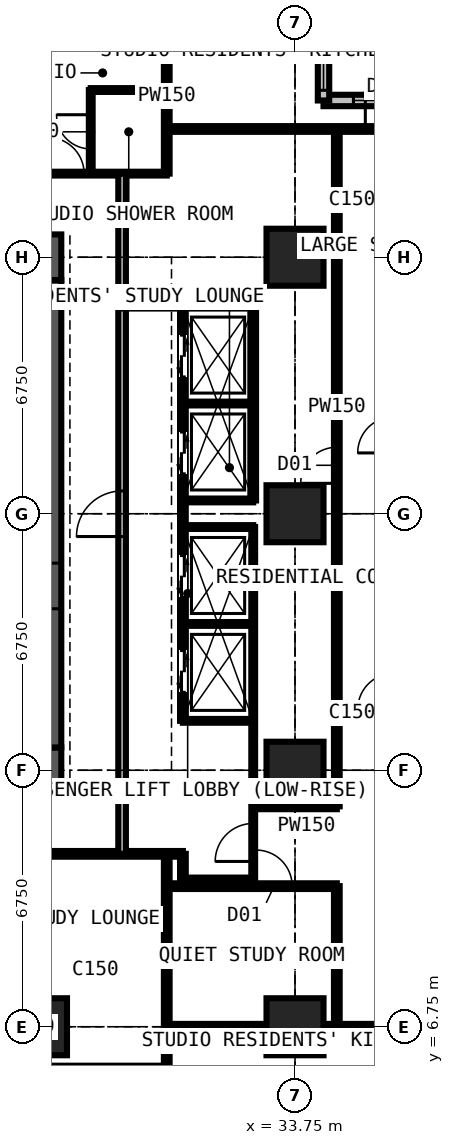
"""IFC4 building model, lengths in metres.
Left out: names, types, materials, properties, quantities, classifications, styles, units other than length and angle.
Written with IfcOpenShell. Run it as: python <this file> out.ifc"""

import sys

from ifc_helpers import new_model, si_unit, direction, frame, frame_2d, origin, origin_2d, place, context, subcontext, project, spatial, rectangle, extrude, element, fill, save


model = new_model("IFC4")
c1 = context("Model", 3, precision=1e-05, world=origin(), true_north=direction((0.0, 1.0)))
c2 = subcontext(c1, "Body", "Model", "MODEL_VIEW")
j1 = project(units=[si_unit("LENGTHUNIT", "METRE"), si_unit("PLANEANGLEUNIT", "RADIAN")], contexts=[c1])
p1 = place(None, origin())
s1 = spatial("IfcSite", under=j1, at=p1, CompositionType="ELEMENT")
p2 = place(p1, origin())
s2 = spatial("IfcBuilding", under=s1, at=p2, CompositionType="ELEMENT")
p3 = place(p2, frame((0.0, 0.0, 112.5)))
s3 = spatial("IfcBuildingStorey", under=s2, at=p3, CompositionType="ELEMENT", Elevation=112.5)
for number, where, z_axis, x_axis in (
    (1, (27.0, 6.75, 0.0), (0.0, 0.0, 1.0), (1.0, 0.0, 0.0)),
    (2, (33.75, 6.75, 0.0), (0.0, 0.0, 1.0), (1.0, 0.0, 0.0)),
    (3, (33.75, 13.5, 0.0), (0.0, 0.0, 1.0), (1.0, 0.0, 0.0)),
    (4, (33.75, 20.25, 0.0), (0.0, 0.0, 1.0), (1.0, 0.0, 0.0)),
    (5, (33.75, 27.0, 0.0), (0.0, 0.0, 1.0), (1.0, 0.0, 0.0)),
):
    element("IfcColumn", number, at=place(p3, frame(where, z_axis=z_axis, x_axis=x_axis)), inside=s3, PredefinedType="COLUMN", context=c2, shape_type="SweptSolid", body=[
        extrude(rectangle(XDim=1.5, YDim=1.5, at=origin_2d()), origin(), (0.0, 0.0, 1.0), 3.6),
    ])
p4 = place(p3, frame((12.9, 13.5, 0.0), z_axis=(0.0, 0.0, 1.0), x_axis=(1.0, 0.0, 0.0)))
e6 = element("IfcWall", 6, at=p4, inside=s3, PredefinedType="SHEAR", context=c2, shape_type="SweptSolid", body=[
    extrude(rectangle(XDim=14.7, YDim=1.2, at=frame_2d((7.35, 0.0))), origin(), (0.0, 0.0, 1.0), 3.6),
])
p5 = place(p3, frame((27.0, 14.1, 0.0), z_axis=(0.0, 0.0, 1.0), x_axis=(0.0, 1.0, 0.0)))
e7 = element("IfcWall", 7, at=p5, inside=s3, PredefinedType="SHEAR", context=c2, shape_type="SweptSolid", body=[
    extrude(rectangle(XDim=12.3, YDim=1.2, at=frame_2d((6.15, 0.0))), origin(), (0.0, 0.0, 1.0), 3.6),
])
p6 = place(p5, frame((3.65, 0.0, 0.0)))
e8 = element("IfcOpeningElement", 8, at=p6, cuts=e7, PredefinedType="OPENING", context=c2, shape_type="SweptSolid", body=[
    extrude(rectangle(XDim=1.2, YDim=2.2, at=frame_2d((0.6, 1.1))), frame((0.0, 0.61, 0.0), z_axis=(0.0, -1.0, 0.0), x_axis=(1.0, 0.0, 0.0)), (0.0, 0.0, 1.0), 1.22),
])
p7 = place(p3, frame((27.6, 27.0, 0.0), z_axis=(0.0, 0.0, 1.0), x_axis=(-1.0, 0.0, 0.0)))
e9 = element("IfcWall", 9, at=p7, inside=s3, PredefinedType="SHEAR", context=c2, shape_type="SweptSolid", body=[
    extrude(rectangle(XDim=14.7, YDim=1.2, at=frame_2d((7.35, 0.0))), origin(), (0.0, 0.0, 1.0), 3.6),
])
p8 = place(p7, frame((5.225, 0.0, 0.0)))
e10 = element("IfcOpeningElement", 10, at=p8, cuts=e9, PredefinedType="OPENING", context=c2, shape_type="SweptSolid", body=[
    extrude(rectangle(XDim=0.9, YDim=2.2, at=frame_2d((0.45, 1.1))), frame((0.0, 0.61, 0.0), z_axis=(0.0, -1.0, 0.0), x_axis=(1.0, 0.0, 0.0)), (0.0, 0.0, 1.0), 1.22),
])
p9 = place(p7, frame((8.2, 0.0, 0.0)))
e11 = element("IfcOpeningElement", 11, at=p9, cuts=e9, PredefinedType="OPENING", context=c2, shape_type="SweptSolid", body=[
    extrude(rectangle(XDim=1.0, YDim=2.2, at=frame_2d((0.5, 1.1))), frame((0.0, 0.61, 0.0), z_axis=(0.0, -1.0, 0.0), x_axis=(1.0, 0.0, 0.0)), (0.0, 0.0, 1.0), 1.22),
])
p10 = place(p3, frame((37.875, 31.125, 0.0), z_axis=(0.0, 0.0, 1.0), x_axis=(-1.0, 0.0, 0.0)))
e12 = element("IfcWall", 12, at=p10, inside=s3, PredefinedType="SOLIDWALL", context=c2, shape_type="SweptSolid", body=[
    extrude(rectangle(XDim=3.375, YDim=0.3, at=frame_2d((1.688, 0.0))), origin(), (0.0, 0.0, 1.0), 3.375),
])
p11 = place(p10, frame((0.788, 0.0, 0.6)))
e13 = element("IfcOpeningElement", 13, at=p11, cuts=e12, PredefinedType="OPENING", context=c2, shape_type="SweptSolid", body=[
    extrude(rectangle(XDim=1.8, YDim=2.1, at=frame_2d((0.9, 1.05))), frame((0.0, 0.16, 0.0), z_axis=(0.0, -1.0, 0.0), x_axis=(1.0, 0.0, 0.0)), (0.0, 0.0, 1.0), 0.32),
])
p12 = place(p3, frame((34.5, 31.125, 0.0), z_axis=(0.0, 0.0, 1.0), x_axis=(0.0, 1.0, 0.0)))
e14 = element("IfcWall", 14, at=p12, inside=s3, PredefinedType="SOLIDWALL", context=c2, shape_type="SweptSolid", body=[
    extrude(rectangle(XDim=3.375, YDim=0.3, at=frame_2d((1.688, 0.0))), origin(), (0.0, 0.0, 1.0), 3.375),
])
p13 = place(p12, frame((0.268, 0.0, 0.9)))
e15 = element("IfcOpeningElement", 15, at=p13, cuts=e14, PredefinedType="OPENING", context=c2, shape_type="SweptSolid", body=[
    extrude(rectangle(XDim=1.5, YDim=1.8, at=frame_2d((0.75, 0.9))), frame((0.0, 0.16, 0.0), z_axis=(0.0, -1.0, 0.0), x_axis=(1.0, 0.0, 0.0)), (0.0, 0.0, 1.0), 0.32),
])
p14 = place(p3, frame((10.125, 11.3, 0.0), z_axis=(0.0, 0.0, 1.0), x_axis=(1.0, 0.0, 0.0)))
e16 = element("IfcWall", 16, at=p14, inside=s3, PredefinedType="PARTITIONING", context=c2, shape_type="SweptSolid", body=[
    extrude(rectangle(XDim=20.675, YDim=0.15, at=frame_2d((10.337, 0.0))), origin(), (0.0, 0.0, 1.0), 3.375),
])
p15 = place(p14, frame((11.312, 0.0, 0.0)))
e17 = element("IfcOpeningElement", 17, at=p15, cuts=e16, PredefinedType="OPENING", context=c2, shape_type="SweptSolid", body=[
    extrude(rectangle(XDim=1.0, YDim=2.2, at=frame_2d((0.5, 1.1))), frame((0.0, 0.085, 0.0), z_axis=(0.0, -1.0, 0.0), x_axis=(1.0, 0.0, 0.0)), (0.0, 0.0, 1.0), 0.17),
])
p16 = place(p3, frame((11.3, 29.2, 0.0), z_axis=(0.0, 0.0, 1.0), x_axis=(1.0, 0.0, 0.0)))
e18 = element("IfcWall", 18, at=p16, inside=s3, PredefinedType="PARTITIONING", context=c2, shape_type="SweptSolid", body=[
    extrude(rectangle(XDim=19.075, YDim=0.1, at=frame_2d((9.538, 0.0))), origin(), (0.0, 0.0, 1.0), 3.375),
])
p17 = place(p16, frame((6.4, 0.0, 0.0)))
e19 = element("IfcOpeningElement", 19, at=p17, cuts=e18, PredefinedType="OPENING", context=c2, shape_type="SweptSolid", body=[
    extrude(rectangle(XDim=0.95, YDim=2.2, at=frame_2d((0.475, 1.1))), frame((0.0, 0.06, 0.0), z_axis=(0.0, -1.0, 0.0), x_axis=(1.0, 0.0, 0.0)), (0.0, 0.0, 1.0), 0.12),
])
p18 = place(p16, frame((13.15, 0.0, 0.0)))
e20 = element("IfcOpeningElement", 20, at=p18, cuts=e18, PredefinedType="OPENING", context=c2, shape_type="SweptSolid", body=[
    extrude(rectangle(XDim=0.95, YDim=2.2, at=frame_2d((0.475, 1.1))), frame((0.0, 0.06, 0.0), z_axis=(0.0, -1.0, 0.0), x_axis=(1.0, 0.0, 0.0)), (0.0, 0.0, 1.0), 0.12),
])
p19 = place(p16, frame((15.95, 0.0, 0.0)))
e21 = element("IfcOpeningElement", 21, at=p19, cuts=e18, PredefinedType="OPENING", context=c2, shape_type="SweptSolid", body=[
    extrude(rectangle(XDim=0.95, YDim=2.2, at=frame_2d((0.475, 1.1))), frame((0.0, 0.06, 0.0), z_axis=(0.0, -1.0, 0.0), x_axis=(1.0, 0.0, 0.0)), (0.0, 0.0, 1.0), 0.12),
])
p20 = place(p16, frame((0.6, 0.0, 0.0)))
e22 = element("IfcOpeningElement", 22, at=p20, cuts=e18, PredefinedType="OPENING", context=c2, shape_type="SweptSolid", body=[
    extrude(rectangle(XDim=1.0, YDim=2.2, at=frame_2d((0.5, 1.1))), frame((0.0, 0.06, 0.0), z_axis=(0.0, -1.0, 0.0), x_axis=(1.0, 0.0, 0.0)), (0.0, 0.0, 1.0), 0.12),
])
p21 = place(p3, frame((28.375, 29.2, 0.0), z_axis=(0.0, 0.0, 1.0), x_axis=(0.0, 1.0, 0.0)))
e23 = element("IfcWall", 23, at=p21, inside=s3, PredefinedType="PARTITIONING", context=c2, shape_type="SweptSolid", body=[
    extrude(rectangle(XDim=2.2, YDim=0.1, at=frame_2d((1.1, 0.0))), origin(), (0.0, 0.0, 1.0), 3.375),
])
p22 = place(p21, frame((0.65, 0.0, 0.0)))
e24 = element("IfcOpeningElement", 24, at=p22, cuts=e23, PredefinedType="OPENING", context=c2, shape_type="SweptSolid", body=[
    extrude(rectangle(XDim=0.9, YDim=2.2, at=frame_2d((0.45, 1.1))), frame((0.0, 0.06, 0.0), z_axis=(0.0, -1.0, 0.0), x_axis=(1.0, 0.0, 0.0)), (0.0, 0.0, 1.0), 0.12),
])
p23 = place(p3, frame((28.375, 31.4, 0.0), z_axis=(0.0, 0.0, 1.0), x_axis=(1.0, 0.0, 0.0)))
e25 = element("IfcWall", 25, at=p23, inside=s3, PredefinedType="PARTITIONING", context=c2, shape_type="SweptSolid", body=[
    extrude(rectangle(XDim=2.0, YDim=0.1, at=frame_2d((1.0, 0.0))), origin(), (0.0, 0.0, 1.0), 3.375),
])
p24 = place(p3, frame((29.2, 11.3, 0.0), z_axis=(0.0, 0.0, 1.0), x_axis=(0.0, 1.0, 0.0)))
e26 = element("IfcWall", 26, at=p24, inside=s3, PredefinedType="PARTITIONING", context=c2, shape_type="SweptSolid", body=[
    extrude(rectangle(XDim=17.9, YDim=0.2, at=frame_2d((8.95, 0.0))), origin(), (0.0, 0.0, 1.0), 3.375),
])
p25 = place(p24, frame((8.35, 0.0, 0.0)))
e27 = element("IfcOpeningElement", 27, at=p25, cuts=e26, PredefinedType="OPENING", context=c2, shape_type="SweptSolid", body=[
    extrude(rectangle(XDim=1.2, YDim=2.2, at=frame_2d((0.6, 1.1))), frame((0.0, 0.11, 0.0), z_axis=(0.0, -1.0, 0.0), x_axis=(1.0, 0.0, 0.0)), (0.0, 0.0, 1.0), 0.22),
])
p26 = place(p3, frame((29.2, 25.7, 0.0), z_axis=(0.0, 0.0, 1.0), x_axis=(1.0, 0.0, 0.0)))
e28 = element("IfcWall", 28, at=p26, inside=s3, PredefinedType="SHEAR", context=c2, shape_type="SweptSolid", body=[
    extrude(rectangle(XDim=3.45, YDim=0.1, at=frame_2d((1.725, 0.0))), origin(), (0.0, 0.0, 1.0), 3.375),
])
p27 = place(p3, frame((30.375, -0.734, 0.0), z_axis=(0.0, 0.0, 1.0), x_axis=(0.0, 1.0, 0.0)))
e29 = element("IfcWall", 29, at=p27, inside=s3, PredefinedType="PARTITIONING", context=c2, shape_type="SweptSolid", body=[
    extrude(rectangle(XDim=12.034, YDim=0.15, at=frame_2d((6.017, 0.0))), origin(), (0.0, 0.0, 1.0), 3.375),
])
p28 = place(p27, frame((5.134, 0.0, 0.0)))
e30 = element("IfcOpeningElement", 30, at=p28, cuts=e29, PredefinedType="OPENING", context=c2, shape_type="SweptSolid", body=[
    extrude(rectangle(XDim=1.0, YDim=2.2, at=frame_2d((0.5, 1.1))), frame((0.0, 0.085, 0.0), z_axis=(0.0, -1.0, 0.0), x_axis=(1.0, 0.0, 0.0)), (0.0, 0.0, 1.0), 0.17),
])
p29 = place(p3, frame((30.375, 6.75, 0.0), z_axis=(0.0, 0.0, 1.0), x_axis=(1.0, 0.0, 0.0)))
e31 = element("IfcWall", 31, at=p29, inside=s3, PredefinedType="PARTITIONING", context=c2, shape_type="SweptSolid", body=[
    extrude(rectangle(XDim=5.975, YDim=0.15, at=frame_2d((2.988, 0.0))), origin(), (0.0, 0.0, 1.0), 2.877),
])
p30 = place(p3, frame((30.375, 10.45, 0.0), z_axis=(0.0, 0.0, 1.0), x_axis=(1.0, 0.0, 0.0)))
e32 = element("IfcWall", 32, at=p30, inside=s3, PredefinedType="PARTITIONING", context=c2, shape_type="SweptSolid", body=[
    extrude(rectangle(XDim=4.475, YDim=0.15, at=frame_2d((2.238, 0.0))), origin(), (0.0, 0.0, 1.0), 3.375),
])
p31 = place(p30, frame((2.35, 0.0, 0.0)))
e33 = element("IfcOpeningElement", 33, at=p31, cuts=e32, PredefinedType="OPENING", context=c2, shape_type="SweptSolid", body=[
    extrude(rectangle(XDim=0.95, YDim=2.2, at=frame_2d((0.475, 1.1))), frame((0.0, 0.085, 0.0), z_axis=(0.0, -1.0, 0.0), x_axis=(1.0, 0.0, 0.0)), (0.0, 0.0, 1.0), 0.17),
])
p32 = place(p3, frame((30.375, 29.2, 0.0), z_axis=(0.0, 0.0, 1.0), x_axis=(0.0, 1.0, 0.0)))
e34 = element("IfcWall", 34, at=p32, inside=s3, PredefinedType="PARTITIONING", context=c2, shape_type="SweptSolid", body=[
    extrude(rectangle(XDim=5.284, YDim=0.15, at=frame_2d((2.642, 0.0))), origin(), (0.0, 0.0, 1.0), 3.375),
])
p33 = place(p3, frame((30.375, 30.375, 0.0), z_axis=(0.0, 0.0, 1.0), x_axis=(1.0, 0.0, 0.0)))
e35 = element("IfcWall", 35, at=p33, inside=s3, PredefinedType="PARTITIONING", context=c2, shape_type="SweptSolid", body=[
    extrude(rectangle(XDim=7.35, YDim=0.15, at=frame_2d((3.675, 0.0))), origin(), (0.0, 0.0, 1.0), 2.877),
])
p34 = place(p33, frame((5.225, 0.0, 0.0)))
e36 = element("IfcOpeningElement", 36, at=p34, cuts=e35, PredefinedType="OPENING", context=c2, shape_type="SweptSolid", body=[
    extrude(rectangle(XDim=1.0, YDim=2.2, at=frame_2d((0.5, 1.1))), frame((0.0, 0.085, 0.0), z_axis=(0.0, -1.0, 0.0), x_axis=(1.0, 0.0, 0.0)), (0.0, 0.0, 1.0), 0.17),
])
p35 = place(p3, frame((30.8, 10.6, 0.0), z_axis=(0.0, 0.0, 1.0), x_axis=(0.0, 1.0, 0.0)))
e37 = element("IfcWall", 37, at=p35, inside=s3, PredefinedType="PARTITIONING", context=c2, shape_type="SweptSolid", body=[
    extrude(rectangle(XDim=0.7, YDim=0.15, at=frame_2d((0.35, 0.0))), origin(), (0.0, 0.0, 1.0), 3.375),
])
p36 = place(p3, frame((30.8, 10.6, 0.0), z_axis=(0.0, 0.0, 1.0), x_axis=(1.0, 0.0, 0.0)))
e38 = element("IfcWall", 38, at=p36, inside=s3, PredefinedType="PARTITIONING", context=c2, shape_type="SweptSolid", body=[
    extrude(rectangle(XDim=1.85, YDim=0.15, at=frame_2d((0.925, 0.0))), origin(), (0.0, 0.0, 1.0), 3.375),
])
p37 = place(p3, frame((30.8, 14.8, 0.0), z_axis=(0.0, 0.0, 1.0), x_axis=(0.0, 1.0, 0.0)))
e39 = element("IfcWall", 39, at=p37, inside=s3, PredefinedType="PARTITIONING", context=c2, shape_type="SweptSolid", body=[
    extrude(rectangle(XDim=10.9, YDim=0.15, at=frame_2d((5.45, 0.0))), origin(), (0.0, 0.0, 1.0), 3.375),
])
p38 = place(p37, frame((0.75, 0.0, 0.0)))
e40 = element("IfcOpeningElement", 40, at=p38, cuts=e39, PredefinedType="OPENING", context=c2, shape_type="SweptSolid", body=[
    extrude(rectangle(XDim=1.1, YDim=2.2, at=frame_2d((0.55, 1.1))), frame((0.0, 0.085, 0.0), z_axis=(0.0, -1.0, 0.0), x_axis=(1.0, 0.0, 0.0)), (0.0, 0.0, 1.0), 0.17),
])
p39 = place(p37, frame((3.25, 0.0, 0.0)))
e41 = element("IfcOpeningElement", 41, at=p39, cuts=e39, PredefinedType="OPENING", context=c2, shape_type="SweptSolid", body=[
    extrude(rectangle(XDim=1.1, YDim=2.2, at=frame_2d((0.55, 1.1))), frame((0.0, 0.085, 0.0), z_axis=(0.0, -1.0, 0.0), x_axis=(1.0, 0.0, 0.0)), (0.0, 0.0, 1.0), 0.17),
])
p40 = place(p37, frame((6.5, 0.0, 0.0)))
e42 = element("IfcOpeningElement", 42, at=p40, cuts=e39, PredefinedType="OPENING", context=c2, shape_type="SweptSolid", body=[
    extrude(rectangle(XDim=1.1, YDim=2.2, at=frame_2d((0.55, 1.1))), frame((0.0, 0.085, 0.0), z_axis=(0.0, -1.0, 0.0), x_axis=(1.0, 0.0, 0.0)), (0.0, 0.0, 1.0), 0.17),
])
p41 = place(p37, frame((9.05, 0.0, 0.0)))
e43 = element("IfcOpeningElement", 43, at=p41, cuts=e39, PredefinedType="OPENING", context=c2, shape_type="SweptSolid", body=[
    extrude(rectangle(XDim=1.1, YDim=2.2, at=frame_2d((0.55, 1.1))), frame((0.0, 0.085, 0.0), z_axis=(0.0, -1.0, 0.0), x_axis=(1.0, 0.0, 0.0)), (0.0, 0.0, 1.0), 0.17),
])
for number, where, z_axis, x_axis in (
    (44, (30.8, 14.8, 0.0), (0.0, 0.0, 1.0), (1.0, 0.0, 0.0)),
    (45, (30.8, 17.35, 0.0), (0.0, 0.0, 1.0), (1.0, 0.0, 0.0)),
    (46, (30.8, 19.9, 0.0), (0.0, 0.0, 1.0), (1.0, 0.0, 0.0)),
    (47, (30.8, 20.6, 0.0), (0.0, 0.0, 1.0), (1.0, 0.0, 0.0)),
    (48, (30.8, 23.15, 0.0), (0.0, 0.0, 1.0), (1.0, 0.0, 0.0)),
):
    element("IfcWall", number, at=place(p3, frame(where, z_axis=z_axis, x_axis=x_axis)), inside=s3, PredefinedType="SHEAR", context=c2, shape_type="SweptSolid", body=[
        extrude(rectangle(XDim=1.85, YDim=0.1, at=frame_2d((0.925, 0.0))), origin(), (0.0, 0.0, 1.0), 3.375),
    ])
p42 = place(p3, frame((32.65, 10.6, 0.0), z_axis=(0.0, 0.0, 1.0), x_axis=(0.0, 1.0, 0.0)))
e49 = element("IfcWall", 49, at=p42, inside=s3, PredefinedType="SHEAR", context=c2, shape_type="SweptSolid", body=[
    extrude(rectangle(XDim=9.3, YDim=0.1, at=frame_2d((4.65, 0.0))), origin(), (0.0, 0.0, 1.0), 3.375),
])
p43 = place(p42, frame((0.5, 0.0, 0.0)))
e50 = element("IfcOpeningElement", 50, at=p43, cuts=e49, PredefinedType="OPENING", context=c2, shape_type="SweptSolid", body=[
    extrude(rectangle(XDim=1.0, YDim=2.2, at=frame_2d((0.5, 1.1))), frame((0.0, 0.06, 0.0), z_axis=(0.0, -1.0, 0.0), x_axis=(1.0, 0.0, 0.0)), (0.0, 0.0, 1.0), 0.12),
])
p44 = place(p3, frame((32.65, 12.55, 0.0), z_axis=(0.0, 0.0, 1.0), x_axis=(1.0, 0.0, 0.0)))
e51 = element("IfcWall", 51, at=p44, inside=s3, PredefinedType="PARTITIONING", context=c2, shape_type="SweptSolid", body=[
    extrude(rectangle(XDim=2.2, YDim=0.15, at=frame_2d((1.1, 0.0))), origin(), (0.0, 0.0, 1.0), 3.375),
])
p45 = place(p3, frame((32.65, 20.6, 0.0), z_axis=(0.0, 0.0, 1.0), x_axis=(0.0, 1.0, 0.0)))
e52 = element("IfcWall", 52, at=p45, inside=s3, PredefinedType="PARTITIONING", context=c2, shape_type="SweptSolid", body=[
    extrude(rectangle(XDim=5.1, YDim=0.15, at=frame_2d((2.55, 0.0))), origin(), (0.0, 0.0, 1.0), 3.375),
])
p46 = place(p3, frame((34.85, 6.75, 0.0), z_axis=(0.0, 0.0, 1.0), x_axis=(0.0, 1.0, 0.0)))
e53 = element("IfcWall", 53, at=p46, inside=s3, PredefinedType="PARTITIONING", context=c2, shape_type="SweptSolid", body=[
    extrude(rectangle(XDim=3.7, YDim=0.15, at=frame_2d((1.85, 0.0))), origin(), (0.0, 0.0, 1.0), 3.375),
])
p47 = place(p3, frame((34.85, 12.55, 0.0), z_axis=(0.0, 0.0, 1.0), x_axis=(0.0, 1.0, 0.0)))
e54 = element("IfcWall", 54, at=p47, inside=s3, PredefinedType="PARTITIONING", context=c2, shape_type="SweptSolid", body=[
    extrude(rectangle(XDim=17.825, YDim=0.15, at=frame_2d((8.913, 0.0))), origin(), (0.0, 0.0, 1.0), 3.375),
])
p48 = place(p47, frame((8.5, 0.0, 0.0)))
e55 = element("IfcOpeningElement", 55, at=p48, cuts=e54, PredefinedType="OPENING", context=c2, shape_type="SweptSolid", body=[
    extrude(rectangle(XDim=0.95, YDim=2.2, at=frame_2d((0.475, 1.1))), frame((0.0, 0.085, 0.0), z_axis=(0.0, -1.0, 0.0), x_axis=(1.0, 0.0, 0.0)), (0.0, 0.0, 1.0), 0.17),
])
p49 = place(p11, origin())
e56 = element("IfcWindow", 56, at=p49, inside=s3, PartitioningType="SINGLE_PANEL", PredefinedType="WINDOW", context=c2, shape_type="SweptSolid", body=[
    extrude(rectangle(XDim=1.8, YDim=2.1, at=frame_2d((0.9, 1.05))), frame((0.0, 0.03, 0.0), z_axis=(0.0, -1.0, 0.0), x_axis=(1.0, 0.0, 0.0)), (0.0, 0.0, 1.0), 0.06),
])
fill(e13, e56)
p50 = place(p13, origin())
e57 = element("IfcWindow", 57, at=p50, inside=s3, PartitioningType="SINGLE_PANEL", PredefinedType="WINDOW", context=c2, shape_type="SweptSolid", body=[
    extrude(rectangle(XDim=1.5, YDim=1.8, at=frame_2d((0.75, 0.9))), frame((0.0, 0.03, 0.0), z_axis=(0.0, -1.0, 0.0), x_axis=(1.0, 0.0, 0.0)), (0.0, 0.0, 1.0), 0.06),
])
fill(e15, e57)
p51 = place(p43, origin())
e58 = element("IfcDoor", 58, at=p51, inside=s3, OperationType="SINGLE_SWING_LEFT", PredefinedType="DOOR", context=c2, shape_type="SweptSolid", body=[
    extrude(rectangle(XDim=1.0, YDim=2.2, at=frame_2d((0.5, 1.1))), frame((0.0, 0.025, 0.0), z_axis=(0.0, -1.0, 0.0), x_axis=(1.0, 0.0, 0.0)), (0.0, 0.0, 1.0), 0.05),
])
fill(e50, e58)
p52 = place(p48, origin())
e59 = element("IfcDoor", 59, at=p52, inside=s3, OperationType="SINGLE_SWING_LEFT", PredefinedType="DOOR", context=c2, shape_type="SweptSolid", body=[
    extrude(rectangle(XDim=0.95, YDim=2.2, at=frame_2d((0.475, 1.1))), frame((0.0, 0.025, 0.0), z_axis=(0.0, -1.0, 0.0), x_axis=(1.0, 0.0, 0.0)), (0.0, 0.0, 1.0), 0.05),
])
fill(e55, e59)
p53 = place(p31, origin())
e60 = element("IfcDoor", 60, at=p53, inside=s3, OperationType="SINGLE_SWING_LEFT", PredefinedType="DOOR", context=c2, shape_type="SweptSolid", body=[
    extrude(rectangle(XDim=0.95, YDim=2.2, at=frame_2d((0.475, 1.1))), frame((0.0, 0.025, 0.0), z_axis=(0.0, -1.0, 0.0), x_axis=(1.0, 0.0, 0.0)), (0.0, 0.0, 1.0), 0.05),
])
fill(e33, e60)
p54 = place(p34, origin())
e61 = element("IfcDoor", 61, at=p54, inside=s3, OperationType="SINGLE_SWING_LEFT", PredefinedType="DOOR", context=c2, shape_type="SweptSolid", body=[
    extrude(rectangle(XDim=1.0, YDim=2.2, at=frame_2d((0.5, 1.1))), frame((0.0, 0.025, 0.0), z_axis=(0.0, -1.0, 0.0), x_axis=(1.0, 0.0, 0.0)), (0.0, 0.0, 1.0), 0.05),
])
fill(e36, e61)
p55 = place(p19, origin())
e62 = element("IfcDoor", 62, at=p55, inside=s3, OperationType="SINGLE_SWING_LEFT", PredefinedType="DOOR", context=c2, shape_type="SweptSolid", body=[
    extrude(rectangle(XDim=0.95, YDim=2.2, at=frame_2d((0.475, 1.1))), frame((0.0, 0.025, 0.0), z_axis=(0.0, -1.0, 0.0), x_axis=(1.0, 0.0, 0.0)), (0.0, 0.0, 1.0), 0.05),
])
fill(e21, e62)
p56 = place(p22, origin())
e63 = element("IfcDoor", 63, at=p56, inside=s3, OperationType="SINGLE_SWING_RIGHT", PredefinedType="DOOR", context=c2, shape_type="SweptSolid", body=[
    extrude(rectangle(XDim=0.9, YDim=2.2, at=frame_2d((0.45, 1.1))), frame((0.0, 0.025, 0.0), z_axis=(0.0, -1.0, 0.0), x_axis=(1.0, 0.0, 0.0)), (0.0, 0.0, 1.0), 0.05),
])
fill(e24, e63)
p57 = place(p38, origin())
e64 = element("IfcDoor", 64, at=p57, inside=s3, OperationType="DOUBLE_DOOR_SLIDING", PredefinedType="DOOR", context=c2, shape_type="SweptSolid", body=[
    extrude(rectangle(XDim=1.1, YDim=2.2, at=frame_2d((0.55, 1.1))), frame((0.0, 0.025, 0.0), z_axis=(0.0, -1.0, 0.0), x_axis=(1.0, 0.0, 0.0)), (0.0, 0.0, 1.0), 0.05),
])
fill(e40, e64)
p58 = place(p39, origin())
e65 = element("IfcDoor", 65, at=p58, inside=s3, OperationType="DOUBLE_DOOR_SLIDING", PredefinedType="DOOR", context=c2, shape_type="SweptSolid", body=[
    extrude(rectangle(XDim=1.1, YDim=2.2, at=frame_2d((0.55, 1.1))), frame((0.0, 0.025, 0.0), z_axis=(0.0, -1.0, 0.0), x_axis=(1.0, 0.0, 0.0)), (0.0, 0.0, 1.0), 0.05),
])
fill(e41, e65)
p59 = place(p40, origin())
e66 = element("IfcDoor", 66, at=p59, inside=s3, OperationType="DOUBLE_DOOR_SLIDING", PredefinedType="DOOR", context=c2, shape_type="SweptSolid", body=[
    extrude(rectangle(XDim=1.1, YDim=2.2, at=frame_2d((0.55, 1.1))), frame((0.0, 0.025, 0.0), z_axis=(0.0, -1.0, 0.0), x_axis=(1.0, 0.0, 0.0)), (0.0, 0.0, 1.0), 0.05),
])
fill(e42, e66)
p60 = place(p41, origin())
e67 = element("IfcDoor", 67, at=p60, inside=s3, OperationType="DOUBLE_DOOR_SLIDING", PredefinedType="DOOR", context=c2, shape_type="SweptSolid", body=[
    extrude(rectangle(XDim=1.1, YDim=2.2, at=frame_2d((0.55, 1.1))), frame((0.0, 0.025, 0.0), z_axis=(0.0, -1.0, 0.0), x_axis=(1.0, 0.0, 0.0)), (0.0, 0.0, 1.0), 0.05),
])
fill(e43, e67)
p61 = place(p25, origin())
e68 = element("IfcDoor", 68, at=p61, inside=s3, OperationType="DOUBLE_DOOR_SINGLE_SWING", PredefinedType="DOOR", context=c2, shape_type="SweptSolid", body=[
    extrude(rectangle(XDim=1.2, YDim=2.2, at=frame_2d((0.6, 1.1))), frame((0.0, 0.025, 0.0), z_axis=(0.0, -1.0, 0.0), x_axis=(1.0, 0.0, 0.0)), (0.0, 0.0, 1.0), 0.05),
])
fill(e27, e68)
save(model, sys.argv[1])
